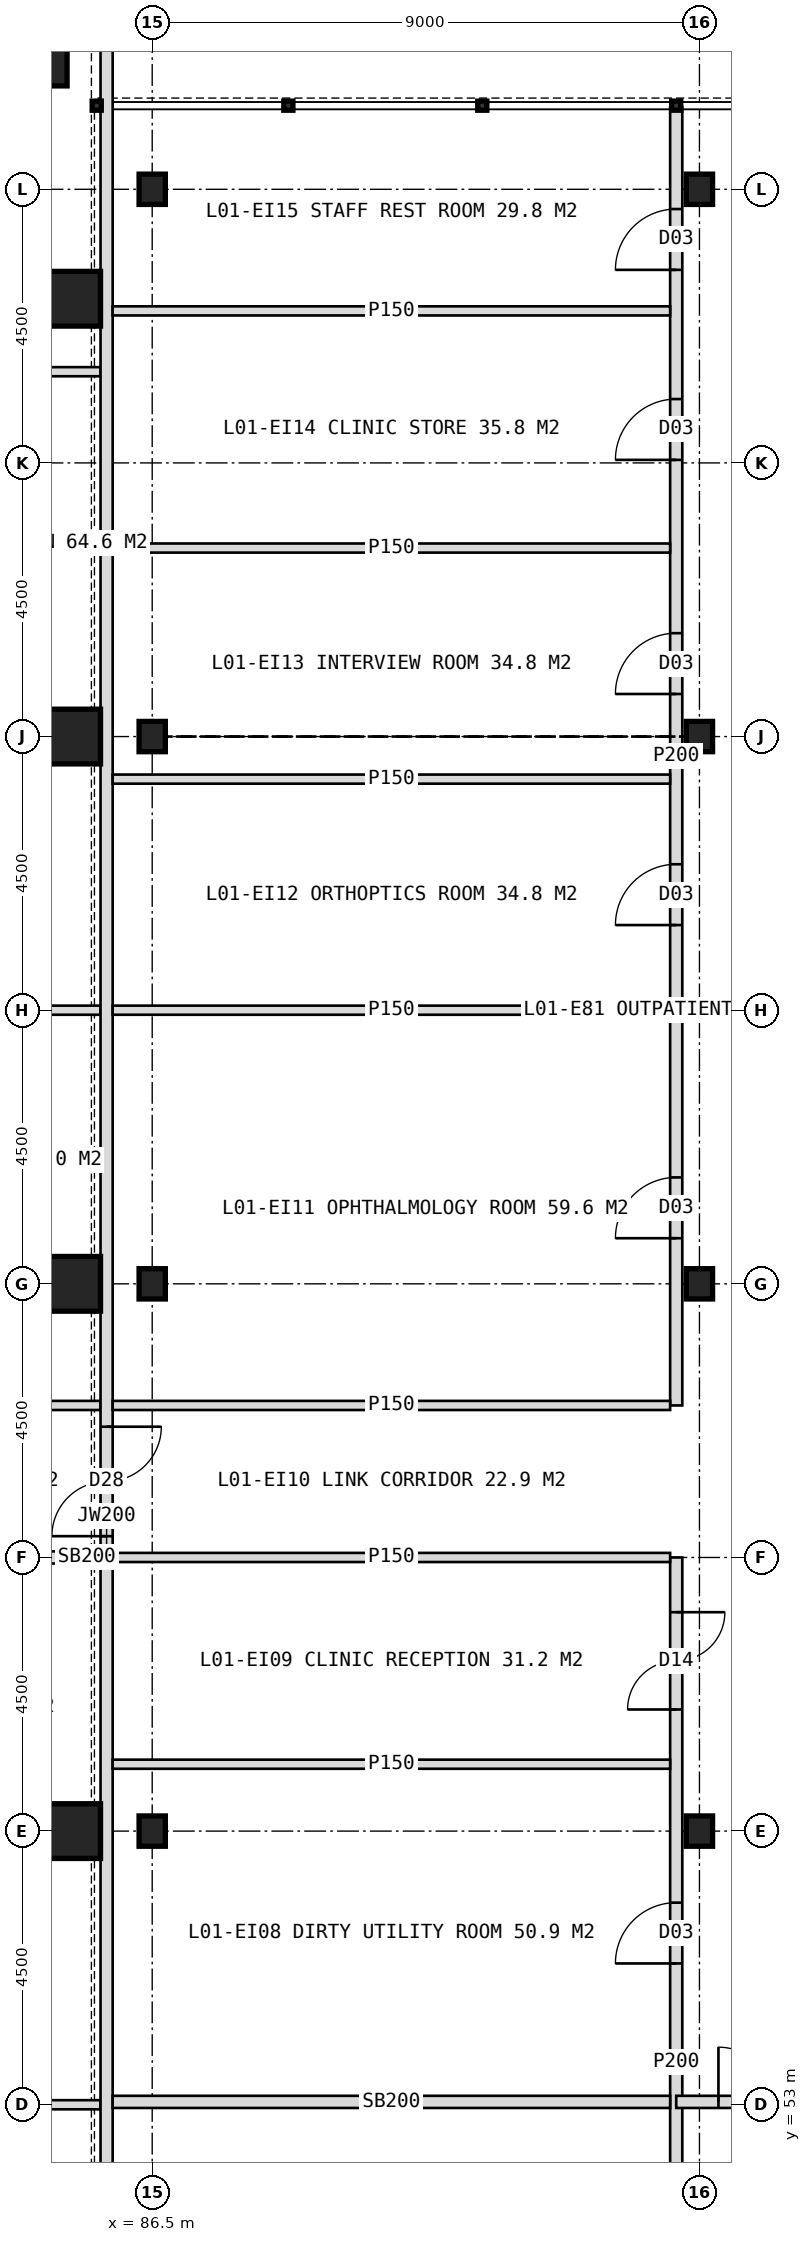
"""IFC4 building model, lengths in metres.
Left out: names, types, materials, properties, quantities, classifications, styles, units other than length and angle.
Written with IfcOpenShell. Run it as: python <this file> out.ifc"""

import sys

from ifc_helpers import new_model, si_unit, direction, frame, frame_2d, origin, origin_2d, place, context, subcontext, project, spatial, rectangle, hollow_rectangle, i_section, extrude, element, fill, save


model = new_model("IFC4")
c1 = context("Model", 3, precision=1e-05, world=origin(), true_north=direction((0.0, 1.0)))
c2 = subcontext(c1, "Body", "Model", "MODEL_VIEW")
j1 = project(units=[si_unit("LENGTHUNIT", "METRE"), si_unit("PLANEANGLEUNIT", "RADIAN")], contexts=[c1])
p1 = place(None, origin())
s1 = spatial("IfcSite", under=j1, at=p1, CompositionType="ELEMENT")
p2 = place(p1, origin())
s2 = spatial("IfcBuilding", under=s1, at=p2, CompositionType="ELEMENT")
p3 = place(p2, frame((0.0, 0.0, 6.0)))
s3 = spatial("IfcBuildingStorey", under=s2, at=p3, CompositionType="ELEMENT", Elevation=6.0)
for number, where, z_axis, x_axis in (
    (1, (85.2, 57.5, 0.0), (0.0, 0.0, 1.0), (1.0, 0.0, 0.0)),
    (2, (85.2, 66.5, 0.0), (0.0, 0.0, 1.0), (1.0, 0.0, 0.0)),
    (3, (85.2, 75.5, 0.0), (0.0, 0.0, 1.0), (1.0, 0.0, 0.0)),
    (4, (85.2, 82.7, 0.0), (0.0, 0.0, 1.0), (1.0, 0.0, 0.0)),
    (5, (84.65, 86.65, 0.0), (0.0, 0.0, 1.0), (1.0, 0.0, 0.0)),
):
    element("IfcColumn", number, at=place(p3, frame(where, z_axis=z_axis, x_axis=x_axis)), inside=s3, PredefinedType="COLUMN", context=c2, shape_type="SweptSolid", body=[
        extrude(hollow_rectangle(XDim=0.9, YDim=0.9, WallThickness=0.08, at=origin_2d()), origin(), (0.0, 0.0, 1.0), 5.0),
    ])
for number, where, z_axis, x_axis in (
    (6, (86.5, 57.5, 0.0), (0.0, 0.0, 1.0), (1.0, 0.0, 0.0)),
    (7, (86.5, 66.5, 0.0), (0.0, 0.0, 1.0), (1.0, 0.0, 0.0)),
    (8, (86.5, 75.5, 0.0), (0.0, 0.0, 1.0), (1.0, 0.0, 0.0)),
    (9, (86.5, 84.5, 0.0), (0.0, 0.0, 1.0), (1.0, 0.0, 0.0)),
    (10, (95.5, 57.5, 0.0), (0.0, 0.0, 1.0), (1.0, 0.0, 0.0)),
    (11, (95.5, 66.5, 0.0), (0.0, 0.0, 1.0), (1.0, 0.0, 0.0)),
    (12, (95.5, 75.5, 0.0), (0.0, 0.0, 1.0), (1.0, 0.0, 0.0)),
    (13, (95.5, 84.5, 0.0), (0.0, 0.0, 1.0), (1.0, 0.0, 0.0)),
):
    element("IfcColumn", number, at=place(p3, frame(where, z_axis=z_axis, x_axis=x_axis)), inside=s3, PredefinedType="COLUMN", context=c2, shape_type="SweptSolid", body=[
        extrude(i_section(OverallWidth=0.432, OverallDepth=0.498, WebThickness=0.056, FlangeThickness=0.089, FilletRadius=0.015, at=origin_2d()), origin(), (0.0, 0.0, 1.0), 5.0),
    ])
for number, where, z_axis, x_axis in (
    (14, (79.5, 81.5, 0.0), (0.0, 0.0, 1.0), (1.0, 0.0, 0.0)),
    (15, (79.5, 71.0, 0.0), (0.0, 0.0, 1.0), (1.0, 0.0, 0.0)),
    (16, (79.5, 64.5, 0.0), (0.0, 0.0, 1.0), (1.0, 0.0, 0.0)),
):
    element("IfcWall", number, at=place(p3, frame(where, z_axis=z_axis, x_axis=x_axis)), inside=s3, PredefinedType="PARTITIONING", context=c2, shape_type="SweptSolid", body=[
        extrude(rectangle(XDim=6.15, YDim=0.15, at=frame_2d((3.075, 0.0))), origin(), (0.0, 0.0, 1.0), 4.7),
    ])
p4 = place(p3, frame((79.5, 62.0, 0.0), z_axis=(0.0, 0.0, 1.0), x_axis=(1.0, 0.0, 0.0)))
e17 = element("IfcWall", 17, at=p4, inside=s3, PredefinedType="SOLIDWALL", context=c2, shape_type="SweptSolid", body=[
    extrude(rectangle(XDim=5.7, YDim=0.2, at=frame_2d((2.85, 0.0))), origin(), (0.0, 0.0, 1.0), 3.9),
])
p5 = place(p3, frame((85.2, 62.0, 0.0), z_axis=(0.0, 0.0, 1.0), x_axis=(1.0, 0.0, 0.0)))
e18 = element("IfcWall", 18, at=p5, inside=s3, PredefinedType="SOLIDWALL", context=c2, shape_type="SweptSolid", body=[
    extrude(rectangle(XDim=0.45, YDim=0.2, at=frame_2d((0.225, 0.0))), origin(), (0.0, 0.0, 1.0), 4.7),
])
p6 = place(p3, frame((79.5, 53.0, 0.0), z_axis=(0.0, 0.0, 1.0), x_axis=(1.0, 0.0, 0.0)))
e19 = element("IfcWall", 19, at=p6, inside=s3, PredefinedType="PARTITIONING", context=c2, shape_type="SweptSolid", body=[
    extrude(rectangle(XDim=6.15, YDim=0.15, at=frame_2d((3.075, 0.0))), origin(), (0.0, 0.0, 1.0), 4.7),
])
p7 = place(p3, frame((95.118, 45.4, 0.0), z_axis=(0.0, 0.0, 1.0), x_axis=(0.0, 1.0, 0.0)))
e20 = element("IfcWall", 20, at=p7, inside=s3, PredefinedType="PARTITIONING", context=c2, shape_type="SweptSolid", body=[
    extrude(rectangle(XDim=16.6, YDim=0.2, at=frame_2d((8.3, 0.0))), origin(), (0.0, 0.0, 1.0), 4.7),
])
p8 = place(p7, frame((1.65, 0.0, 0.0)))
e21 = element("IfcOpeningElement", 21, at=p8, cuts=e20, PredefinedType="OPENING", context=c2, shape_type="SweptSolid", body=[
    extrude(rectangle(XDim=1.0, YDim=2.1, at=frame_2d((0.5, 1.05))), frame((0.0, 0.11, 0.0), z_axis=(0.0, -1.0, 0.0), x_axis=(1.0, 0.0, 0.0)), (0.0, 0.0, 1.0), 0.22),
])
p9 = place(p7, frame((5.473, 0.0, 0.0)))
e22 = element("IfcOpeningElement", 22, at=p9, cuts=e20, PredefinedType="OPENING", context=c2, shape_type="SweptSolid", body=[
    extrude(rectangle(XDim=1.0, YDim=2.1, at=frame_2d((0.5, 1.05))), frame((0.0, 0.11, 0.0), z_axis=(0.0, -1.0, 0.0), x_axis=(1.0, 0.0, 0.0)), (0.0, 0.0, 1.0), 0.22),
])
p10 = place(p7, frame((9.924, 0.0, 0.0)))
e23 = element("IfcOpeningElement", 23, at=p10, cuts=e20, PredefinedType="OPENING", context=c2, shape_type="SweptSolid", body=[
    extrude(rectangle(XDim=1.0, YDim=2.1, at=frame_2d((0.5, 1.05))), frame((0.0, 0.11, 0.0), z_axis=(0.0, -1.0, 0.0), x_axis=(1.0, 0.0, 0.0)), (0.0, 0.0, 1.0), 0.22),
])
p11 = place(p7, frame((14.1, 0.0, 0.0)))
e24 = element("IfcOpeningElement", 24, at=p11, cuts=e20, PredefinedType="OPENING", context=c2, shape_type="SweptSolid", body=[
    extrude(rectangle(XDim=1.6, YDim=2.2, at=frame_2d((0.8, 1.1))), frame((0.0, 0.11, 0.0), z_axis=(0.0, -1.0, 0.0), x_axis=(1.0, 0.0, 0.0)), (0.0, 0.0, 1.0), 0.22),
])
p12 = place(p3, frame((95.118, 64.5, 0.0), z_axis=(0.0, 0.0, 1.0), x_axis=(0.0, 1.0, 0.0)))
e25 = element("IfcWall", 25, at=p12, inside=s3, PredefinedType="PARTITIONING", context=c2, shape_type="SweptSolid", body=[
    extrude(rectangle(XDim=21.35, YDim=0.2, at=frame_2d((10.675, 0.0))), origin(), (0.0, 0.0, 1.0), 4.7),
])
p13 = place(p12, frame((2.75, 0.0, 0.0)))
e26 = element("IfcOpeningElement", 26, at=p13, cuts=e25, PredefinedType="OPENING", context=c2, shape_type="SweptSolid", body=[
    extrude(rectangle(XDim=1.0, YDim=2.1, at=frame_2d((0.5, 1.05))), frame((0.0, 0.11, 0.0), z_axis=(0.0, -1.0, 0.0), x_axis=(1.0, 0.0, 0.0)), (0.0, 0.0, 1.0), 0.22),
])
p14 = place(p12, frame((7.9, 0.0, 0.0)))
e27 = element("IfcOpeningElement", 27, at=p14, cuts=e25, PredefinedType="OPENING", context=c2, shape_type="SweptSolid", body=[
    extrude(rectangle(XDim=1.0, YDim=2.1, at=frame_2d((0.5, 1.05))), frame((0.0, 0.11, 0.0), z_axis=(0.0, -1.0, 0.0), x_axis=(1.0, 0.0, 0.0)), (0.0, 0.0, 1.0), 0.22),
])
p15 = place(p12, frame((11.7, 0.0, 0.0)))
e28 = element("IfcOpeningElement", 28, at=p15, cuts=e25, PredefinedType="OPENING", context=c2, shape_type="SweptSolid", body=[
    extrude(rectangle(XDim=1.0, YDim=2.1, at=frame_2d((0.5, 1.05))), frame((0.0, 0.11, 0.0), z_axis=(0.0, -1.0, 0.0), x_axis=(1.0, 0.0, 0.0)), (0.0, 0.0, 1.0), 0.22),
])
p16 = place(p12, frame((15.55, 0.0, 0.0)))
e29 = element("IfcOpeningElement", 29, at=p16, cuts=e25, PredefinedType="OPENING", context=c2, shape_type="SweptSolid", body=[
    extrude(rectangle(XDim=1.0, YDim=2.1, at=frame_2d((0.5, 1.05))), frame((0.0, 0.11, 0.0), z_axis=(0.0, -1.0, 0.0), x_axis=(1.0, 0.0, 0.0)), (0.0, 0.0, 1.0), 0.22),
])
p17 = place(p12, frame((18.675, 0.0, 0.0)))
e30 = element("IfcOpeningElement", 30, at=p17, cuts=e25, PredefinedType="OPENING", context=c2, shape_type="SweptSolid", body=[
    extrude(rectangle(XDim=1.0, YDim=2.1, at=frame_2d((0.5, 1.05))), frame((0.0, 0.11, 0.0), z_axis=(0.0, -1.0, 0.0), x_axis=(1.0, 0.0, 0.0)), (0.0, 0.0, 1.0), 0.22),
])
p18 = place(p3, frame((98.307, 53.047, 0.0), z_axis=(0.0, 0.0, 1.0), x_axis=(-1.0, 0.0, 0.0)))
e31 = element("IfcWall", 31, at=p18, inside=s3, PredefinedType="SOLIDWALL", context=c2, shape_type="SweptSolid", body=[
    extrude(rectangle(XDim=3.189, YDim=0.2, at=frame_2d((1.594, 0.0))), origin(), (0.0, 0.0, 1.0), 4.7),
])
p19 = place(p18, frame((0.695, 0.0, 0.0)))
e32 = element("IfcOpeningElement", 32, at=p19, cuts=e31, PredefinedType="OPENING", context=c2, shape_type="SweptSolid", body=[
    extrude(rectangle(XDim=1.8, YDim=2.2, at=frame_2d((0.9, 1.1))), frame((0.0, 0.11, 0.0), z_axis=(0.0, -1.0, 0.0), x_axis=(1.0, 0.0, 0.0)), (0.0, 0.0, 1.0), 0.22),
])
p20 = place(p3, frame((85.75, 36.8, 0.0), z_axis=(0.0, 0.0, 1.0), x_axis=(0.0, 1.0, 0.0)))
e33 = element("IfcWall", 33, at=p20, inside=s3, PredefinedType="SOLIDWALL", context=c2, shape_type="SweptSolid", body=[
    extrude(rectangle(XDim=50.4, YDim=0.2, at=frame_2d((25.2, 0.0))), origin(), (0.0, 0.0, 1.0), 4.7),
])
p21 = place(p20, frame((6.25, 0.0, 0.0)))
e34 = element("IfcOpeningElement", 34, at=p21, cuts=e33, PredefinedType="OPENING", context=c2, shape_type="SweptSolid", body=[
    extrude(rectangle(XDim=1.8, YDim=2.2, at=frame_2d((0.9, 1.1))), frame((0.0, 0.11, 0.0), z_axis=(0.0, -1.0, 0.0), x_axis=(1.0, 0.0, 0.0)), (0.0, 0.0, 1.0), 0.22),
])
p22 = place(p20, frame((25.55, 0.0, 0.0)))
e35 = element("IfcOpeningElement", 35, at=p22, cuts=e33, PredefinedType="OPENING", context=c2, shape_type="SweptSolid", body=[
    extrude(rectangle(XDim=1.8, YDim=2.2, at=frame_2d((0.9, 1.1))), frame((0.0, 0.11, 0.0), z_axis=(0.0, -1.0, 0.0), x_axis=(1.0, 0.0, 0.0)), (0.0, 0.0, 1.0), 0.22),
])
p23 = place(p3, frame((95.018, 53.047, 0.0), z_axis=(0.0, 0.0, 1.0), x_axis=(-1.0, 0.0, 0.0)))
e36 = element("IfcWall", 36, at=p23, inside=s3, PredefinedType="SOLIDWALL", context=c2, shape_type="SweptSolid", body=[
    extrude(rectangle(XDim=9.168, YDim=0.2, at=frame_2d((4.584, 0.0))), origin(), (0.0, 0.0, 1.0), 4.7),
])
for number, where, z_axis, x_axis in (
    (37, (95.018, 58.6, 0.0), (0.0, 0.0, 1.0), (-1.0, 0.0, 0.0)),
    (38, (95.018, 62.0, 0.0), (0.0, 0.0, 1.0), (-1.0, 0.0, 0.0)),
    (39, (95.018, 64.5, 0.0), (0.0, 0.0, 1.0), (-1.0, 0.0, 0.0)),
    (40, (95.018, 71.0, 0.0), (0.0, 0.0, 1.0), (-1.0, 0.0, 0.0)),
    (41, (95.018, 74.8, 0.0), (0.0, 0.0, 1.0), (-1.0, 0.0, 0.0)),
    (42, (95.018, 78.6, 0.0), (0.0, 0.0, 1.0), (-1.0, 0.0, 0.0)),
    (43, (95.018, 82.5, 0.0), (0.0, 0.0, 1.0), (-1.0, 0.0, 0.0)),
):
    element("IfcWall", number, at=place(p3, frame(where, z_axis=z_axis, x_axis=x_axis)), inside=s3, PredefinedType="PARTITIONING", context=c2, shape_type="SweptSolid", body=[
        extrude(rectangle(XDim=9.168, YDim=0.15, at=frame_2d((4.584, 0.0))), origin(), (0.0, 0.0, 1.0), 4.7),
    ])
p24 = place(p19, origin())
e44 = element("IfcDoor", 44, at=p24, inside=s3, OperationType="DOUBLE_DOOR_DOUBLE_SWING", PredefinedType="DOOR", context=c2, shape_type="SweptSolid", body=[
    extrude(rectangle(XDim=1.8, YDim=2.2, at=frame_2d((0.9, 1.1))), frame((0.0, 0.025, 0.0), z_axis=(0.0, -1.0, 0.0), x_axis=(1.0, 0.0, 0.0)), (0.0, 0.0, 1.0), 0.05),
])
fill(e32, e44)
p25 = place(p22, origin())
e45 = element("IfcDoor", 45, at=p25, inside=s3, OperationType="DOUBLE_DOOR_SINGLE_SWING", PredefinedType="DOOR", context=c2, shape_type="SweptSolid", body=[
    extrude(rectangle(XDim=1.8, YDim=2.2, at=frame_2d((0.9, 1.1))), frame((0.0, 0.025, 0.0), z_axis=(0.0, -1.0, 0.0), x_axis=(1.0, 0.0, 0.0)), (0.0, 0.0, 1.0), 0.05),
])
fill(e35, e45)
p26 = place(p10, origin())
e46 = element("IfcDoor", 46, at=p26, inside=s3, OperationType="SINGLE_SWING_LEFT", PredefinedType="DOOR", context=c2, shape_type="SweptSolid", body=[
    extrude(rectangle(XDim=1.0, YDim=2.1, at=frame_2d((0.5, 1.05))), frame((0.0, 0.025, 0.0), z_axis=(0.0, -1.0, 0.0), x_axis=(1.0, 0.0, 0.0)), (0.0, 0.0, 1.0), 0.05),
])
fill(e23, e46)
p27 = place(p11, origin())
e47 = element("IfcDoor", 47, at=p27, inside=s3, OperationType="DOUBLE_DOOR_DOUBLE_SWING", PredefinedType="DOOR", context=c2, shape_type="SweptSolid", body=[
    extrude(rectangle(XDim=1.6, YDim=2.2, at=frame_2d((0.8, 1.1))), frame((0.0, 0.025, 0.0), z_axis=(0.0, -1.0, 0.0), x_axis=(1.0, 0.0, 0.0)), (0.0, 0.0, 1.0), 0.05),
])
fill(e24, e47)
p28 = place(p13, origin())
e48 = element("IfcDoor", 48, at=p28, inside=s3, OperationType="SINGLE_SWING_LEFT", PredefinedType="DOOR", context=c2, shape_type="SweptSolid", body=[
    extrude(rectangle(XDim=1.0, YDim=2.1, at=frame_2d((0.5, 1.05))), frame((0.0, 0.025, 0.0), z_axis=(0.0, -1.0, 0.0), x_axis=(1.0, 0.0, 0.0)), (0.0, 0.0, 1.0), 0.05),
])
fill(e26, e48)
p29 = place(p14, origin())
e49 = element("IfcDoor", 49, at=p29, inside=s3, OperationType="SINGLE_SWING_LEFT", PredefinedType="DOOR", context=c2, shape_type="SweptSolid", body=[
    extrude(rectangle(XDim=1.0, YDim=2.1, at=frame_2d((0.5, 1.05))), frame((0.0, 0.025, 0.0), z_axis=(0.0, -1.0, 0.0), x_axis=(1.0, 0.0, 0.0)), (0.0, 0.0, 1.0), 0.05),
])
fill(e27, e49)
p30 = place(p15, origin())
e50 = element("IfcDoor", 50, at=p30, inside=s3, OperationType="SINGLE_SWING_LEFT", PredefinedType="DOOR", context=c2, shape_type="SweptSolid", body=[
    extrude(rectangle(XDim=1.0, YDim=2.1, at=frame_2d((0.5, 1.05))), frame((0.0, 0.025, 0.0), z_axis=(0.0, -1.0, 0.0), x_axis=(1.0, 0.0, 0.0)), (0.0, 0.0, 1.0), 0.05),
])
fill(e28, e50)
p31 = place(p16, origin())
e51 = element("IfcDoor", 51, at=p31, inside=s3, OperationType="SINGLE_SWING_LEFT", PredefinedType="DOOR", context=c2, shape_type="SweptSolid", body=[
    extrude(rectangle(XDim=1.0, YDim=2.1, at=frame_2d((0.5, 1.05))), frame((0.0, 0.025, 0.0), z_axis=(0.0, -1.0, 0.0), x_axis=(1.0, 0.0, 0.0)), (0.0, 0.0, 1.0), 0.05),
])
fill(e29, e51)
p32 = place(p17, origin())
e52 = element("IfcDoor", 52, at=p32, inside=s3, OperationType="SINGLE_SWING_LEFT", PredefinedType="DOOR", context=c2, shape_type="SweptSolid", body=[
    extrude(rectangle(XDim=1.0, YDim=2.1, at=frame_2d((0.5, 1.05))), frame((0.0, 0.025, 0.0), z_axis=(0.0, -1.0, 0.0), x_axis=(1.0, 0.0, 0.0)), (0.0, 0.0, 1.0), 0.05),
])
fill(e30, e52)
save(model, sys.argv[1])
